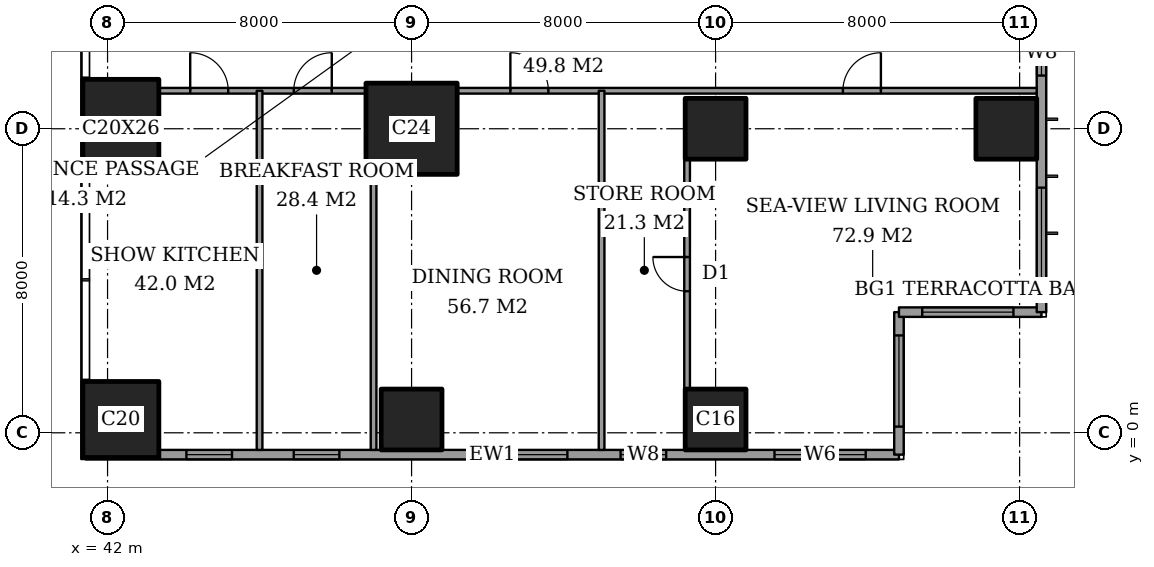
"""IFC4 building model, lengths in metres.
Left out: names, types, materials, properties, quantities, classifications, styles, units other than length and angle.
Written with IfcOpenShell. Run it as: python <this file> out.ifc"""

import sys

from ifc_helpers import new_model, si_unit, direction, frame, frame_2d, origin, origin_2d, place, context, subcontext, project, spatial, rectangle, extrude, element, fill, save


model = new_model("IFC4")
c1 = context("Model", 3, precision=1e-05, world=origin(), true_north=direction((0.0, 1.0)))
c2 = subcontext(c1, "Body", "Model", "MODEL_VIEW")
j1 = project(units=[si_unit("LENGTHUNIT", "METRE"), si_unit("PLANEANGLEUNIT", "RADIAN")], contexts=[c1])
p1 = place(None, origin())
s1 = spatial("IfcSite", under=j1, at=p1, CompositionType="ELEMENT")
p2 = place(p1, origin())
s2 = spatial("IfcBuilding", under=s1, at=p2, CompositionType="ELEMENT")
p3 = place(p2, frame((0.0, 0.0, 230.4)))
s3 = spatial("IfcBuildingStorey", under=s2, at=p3, CompositionType="ELEMENT", Elevation=230.4)
p4 = place(p3, frame((42.35, 0.35, 0.0), z_axis=(0.0, 0.0, 1.0), x_axis=(1.0, 0.0, 0.0)))
e1 = element("IfcColumn", 1, at=p4, inside=s3, PredefinedType="COLUMN", context=c2, shape_type="SweptSolid", body=[
    extrude(rectangle(XDim=2.0, YDim=2.0, at=origin_2d()), origin(), (0.0, 0.0, 1.0), 3.6),
])
p5 = place(p3, frame((42.35, 8.0, 0.0), z_axis=(0.0, 0.0, 1.0), x_axis=(1.0, 0.0, 0.0)))
e2 = element("IfcColumn", 2, at=p5, inside=s3, PredefinedType="COLUMN", context=c2, shape_type="SweptSolid", body=[
    extrude(rectangle(XDim=2.0, YDim=2.6, at=origin_2d()), origin(), (0.0, 0.0, 1.0), 3.6),
])
p6 = place(p3, frame((50.0, 0.35, 0.0), z_axis=(0.0, 0.0, 1.0), x_axis=(1.0, 0.0, 0.0)))
e3 = element("IfcColumn", 3, at=p6, inside=s3, PredefinedType="COLUMN", context=c2, shape_type="SweptSolid", body=[
    extrude(rectangle(XDim=1.6, YDim=1.6, at=origin_2d()), origin(), (0.0, 0.0, 1.0), 3.6),
])
p7 = place(p3, frame((50.0, 8.0, 0.0), z_axis=(0.0, 0.0, 1.0), x_axis=(1.0, 0.0, 0.0)))
e4 = element("IfcColumn", 4, at=p7, inside=s3, PredefinedType="COLUMN", context=c2, shape_type="SweptSolid", body=[
    extrude(rectangle(XDim=2.4, YDim=2.4, at=origin_2d()), origin(), (0.0, 0.0, 1.0), 3.6),
])
for number, where, z_axis, x_axis in (
    (5, (58.0, 0.35, 0.0), (0.0, 0.0, 1.0), (1.0, 0.0, 0.0)),
    (6, (58.0, 8.0, 0.0), (0.0, 0.0, 1.0), (1.0, 0.0, 0.0)),
    (7, (65.65, 8.0, 0.0), (0.0, 0.0, 1.0), (1.0, 0.0, 0.0)),
):
    element("IfcColumn", number, at=place(p3, frame(where, z_axis=z_axis, x_axis=x_axis)), inside=s3, PredefinedType="COLUMN", context=c2, shape_type="SweptSolid", body=[
        extrude(rectangle(XDim=1.6, YDim=1.6, at=origin_2d()), origin(), (0.0, 0.0, 1.0), 3.6),
    ])
p8 = place(p3, frame((41.425, -0.575, 0.0), z_axis=(0.0, 0.0, 1.0), x_axis=(1.0, 0.0, 0.0)))
e8 = element("IfcWall", 8, at=p8, inside=s3, PredefinedType="SOLIDWALL", context=c2, shape_type="SweptSolid", body=[
    extrude(rectangle(XDim=21.4, YDim=0.25, at=frame_2d((10.7, 0.0))), origin(), (0.0, 0.0, 1.0), 3.6),
])
p9 = place(p8, frame((2.65, 0.0, 0.6)))
e9 = element("IfcOpeningElement", 9, at=p9, cuts=e8, PredefinedType="OPENING", context=c2, shape_type="SweptSolid", body=[
    extrude(rectangle(XDim=1.2, YDim=2.0, at=frame_2d((0.6, 1.0))), frame((0.0, 0.135, 0.0), z_axis=(0.0, -1.0, 0.0), x_axis=(1.0, 0.0, 0.0)), (0.0, 0.0, 1.0), 0.27),
])
p10 = place(p8, frame((5.475, 0.0, 0.6)))
e10 = element("IfcOpeningElement", 10, at=p10, cuts=e8, PredefinedType="OPENING", context=c2, shape_type="SweptSolid", body=[
    extrude(rectangle(XDim=1.2, YDim=2.0, at=frame_2d((0.6, 1.0))), frame((0.0, 0.135, 0.0), z_axis=(0.0, -1.0, 0.0), x_axis=(1.0, 0.0, 0.0)), (0.0, 0.0, 1.0), 0.27),
])
p11 = place(p8, frame((10.275, 0.0, 0.6)))
e11 = element("IfcOpeningElement", 11, at=p11, cuts=e8, PredefinedType="OPENING", context=c2, shape_type="SweptSolid", body=[
    extrude(rectangle(XDim=2.4, YDim=2.0, at=frame_2d((1.2, 1.0))), frame((0.0, 0.135, 0.0), z_axis=(0.0, -1.0, 0.0), x_axis=(1.0, 0.0, 0.0)), (0.0, 0.0, 1.0), 0.27),
])
p12 = place(p8, frame((14.075, 0.0, 0.6)))
e12 = element("IfcOpeningElement", 12, at=p12, cuts=e8, PredefinedType="OPENING", context=c2, shape_type="SweptSolid", body=[
    extrude(rectangle(XDim=1.2, YDim=2.0, at=frame_2d((0.6, 1.0))), frame((0.0, 0.135, 0.0), z_axis=(0.0, -1.0, 0.0), x_axis=(1.0, 0.0, 0.0)), (0.0, 0.0, 1.0), 0.27),
])
p13 = place(p8, frame((18.125, 0.0, 0.6)))
e13 = element("IfcOpeningElement", 13, at=p13, cuts=e8, PredefinedType="OPENING", context=c2, shape_type="SweptSolid", body=[
    extrude(rectangle(XDim=2.4, YDim=2.0, at=frame_2d((1.2, 1.0))), frame((0.0, 0.135, 0.0), z_axis=(0.0, -1.0, 0.0), x_axis=(1.0, 0.0, 0.0)), (0.0, 0.0, 1.0), 0.27),
])
p14 = place(p3, frame((62.825, -0.575, 0.0), z_axis=(0.0, 0.0, 1.0), x_axis=(0.0, 1.0, 0.0)))
e14 = element("IfcWall", 14, at=p14, inside=s3, PredefinedType="SOLIDWALL", context=c2, shape_type="SweptSolid", body=[
    extrude(rectangle(XDim=3.75, YDim=0.25, at=frame_2d((1.875, 0.0))), origin(), (0.0, 0.0, 1.0), 3.6),
])
p15 = place(p14, frame((0.738, 0.0, 0.6)))
e15 = element("IfcOpeningElement", 15, at=p15, cuts=e14, PredefinedType="OPENING", context=c2, shape_type="SweptSolid", body=[
    extrude(rectangle(XDim=2.4, YDim=2.0, at=frame_2d((1.2, 1.0))), frame((0.0, 0.135, 0.0), z_axis=(0.0, -1.0, 0.0), x_axis=(1.0, 0.0, 0.0)), (0.0, 0.0, 1.0), 0.27),
])
p16 = place(p3, frame((62.825, 3.175, 0.0), z_axis=(0.0, 0.0, 1.0), x_axis=(1.0, 0.0, 0.0)))
e16 = element("IfcWall", 16, at=p16, inside=s3, PredefinedType="SOLIDWALL", context=c2, shape_type="SweptSolid", body=[
    extrude(rectangle(XDim=3.75, YDim=0.25, at=frame_2d((1.875, 0.0))), origin(), (0.0, 0.0, 1.0), 3.6),
])
p17 = place(p16, frame((0.613, 0.0, 0.6)))
e17 = element("IfcOpeningElement", 17, at=p17, cuts=e16, PredefinedType="OPENING", context=c2, shape_type="SweptSolid", body=[
    extrude(rectangle(XDim=2.4, YDim=2.0, at=frame_2d((1.2, 1.0))), frame((0.0, 0.135, 0.0), z_axis=(0.0, -1.0, 0.0), x_axis=(1.0, 0.0, 0.0)), (0.0, 0.0, 1.0), 0.27),
])
p18 = place(p3, frame((66.575, 3.175, 0.0), z_axis=(0.0, 0.0, 1.0), x_axis=(0.0, 1.0, 0.0)))
e18 = element("IfcWall", 18, at=p18, inside=s3, PredefinedType="SOLIDWALL", context=c2, shape_type="SweptSolid", body=[
    extrude(rectangle(XDim=41.65, YDim=0.25, at=frame_2d((20.825, 0.0))), origin(), (0.0, 0.0, 1.0), 3.6),
])
p19 = place(p18, frame((0.875, 0.0, 0.6)))
e19 = element("IfcOpeningElement", 19, at=p19, cuts=e18, PredefinedType="OPENING", context=c2, shape_type="SweptSolid", body=[
    extrude(rectangle(XDim=2.4, YDim=2.0, at=frame_2d((1.2, 1.0))), frame((0.0, 0.135, 0.0), z_axis=(0.0, -1.0, 0.0), x_axis=(1.0, 0.0, 0.0)), (0.0, 0.0, 1.0), 0.27),
])
p20 = place(p18, frame((6.225, 0.0, 0.6)))
e20 = element("IfcOpeningElement", 20, at=p20, cuts=e18, PredefinedType="OPENING", context=c2, shape_type="SweptSolid", body=[
    extrude(rectangle(XDim=1.2, YDim=2.0, at=frame_2d((0.6, 1.0))), frame((0.0, 0.135, 0.0), z_axis=(0.0, -1.0, 0.0), x_axis=(1.0, 0.0, 0.0)), (0.0, 0.0, 1.0), 0.27),
])
p21 = place(p18, frame((8.725, 0.0, 0.6)))
e21 = element("IfcOpeningElement", 21, at=p21, cuts=e18, PredefinedType="OPENING", context=c2, shape_type="SweptSolid", body=[
    extrude(rectangle(XDim=2.4, YDim=2.0, at=frame_2d((1.2, 1.0))), frame((0.0, 0.135, 0.0), z_axis=(0.0, -1.0, 0.0), x_axis=(1.0, 0.0, 0.0)), (0.0, 0.0, 1.0), 0.27),
])
p22 = place(p18, frame((15.725, 0.0, 0.6)))
e22 = element("IfcOpeningElement", 22, at=p22, cuts=e18, PredefinedType="OPENING", context=c2, shape_type="SweptSolid", body=[
    extrude(rectangle(XDim=2.4, YDim=2.0, at=frame_2d((1.2, 1.0))), frame((0.0, 0.135, 0.0), z_axis=(0.0, -1.0, 0.0), x_axis=(1.0, 0.0, 0.0)), (0.0, 0.0, 1.0), 0.27),
])
p23 = place(p18, frame((23.525, 0.0, 0.6)))
e23 = element("IfcOpeningElement", 23, at=p23, cuts=e18, PredefinedType="OPENING", context=c2, shape_type="SweptSolid", body=[
    extrude(rectangle(XDim=2.4, YDim=2.0, at=frame_2d((1.2, 1.0))), frame((0.0, 0.135, 0.0), z_axis=(0.0, -1.0, 0.0), x_axis=(1.0, 0.0, 0.0)), (0.0, 0.0, 1.0), 0.27),
])
p24 = place(p18, frame((30.725, 0.0, 0.6)))
e24 = element("IfcOpeningElement", 24, at=p24, cuts=e18, PredefinedType="OPENING", context=c2, shape_type="SweptSolid", body=[
    extrude(rectangle(XDim=2.4, YDim=2.0, at=frame_2d((1.2, 1.0))), frame((0.0, 0.135, 0.0), z_axis=(0.0, -1.0, 0.0), x_axis=(1.0, 0.0, 0.0)), (0.0, 0.0, 1.0), 0.27),
])
p25 = place(p18, frame((34.525, 0.0, 0.6)))
e25 = element("IfcOpeningElement", 25, at=p25, cuts=e18, PredefinedType="OPENING", context=c2, shape_type="SweptSolid", body=[
    extrude(rectangle(XDim=1.2, YDim=2.0, at=frame_2d((0.6, 1.0))), frame((0.0, 0.135, 0.0), z_axis=(0.0, -1.0, 0.0), x_axis=(1.0, 0.0, 0.0)), (0.0, 0.0, 1.0), 0.27),
])
p26 = place(p18, frame((38.375, 0.0, 0.6)))
e26 = element("IfcOpeningElement", 26, at=p26, cuts=e18, PredefinedType="OPENING", context=c2, shape_type="SweptSolid", body=[
    extrude(rectangle(XDim=2.4, YDim=2.0, at=frame_2d((1.2, 1.0))), frame((0.0, 0.135, 0.0), z_axis=(0.0, -1.0, 0.0), x_axis=(1.0, 0.0, 0.0)), (0.0, 0.0, 1.0), 0.27),
])
p27 = place(p3, frame((43.35, 9.0, 0.0), z_axis=(0.0, 0.0, 1.0), x_axis=(1.0, 0.0, 0.0)))
e27 = element("IfcWall", 27, at=p27, inside=s3, PredefinedType="PARTITIONING", context=c2, shape_type="SweptSolid", body=[
    extrude(rectangle(XDim=5.45, YDim=0.15, at=frame_2d((2.725, 0.0))), origin(), (0.0, 0.0, 1.0), 3.35),
])
p28 = place(p27, frame((3.55, 0.0, 0.0)))
e28 = element("IfcOpeningElement", 28, at=p28, cuts=e27, PredefinedType="OPENING", context=c2, shape_type="SweptSolid", body=[
    extrude(rectangle(XDim=1.0, YDim=2.1, at=frame_2d((0.5, 1.05))), frame((0.0, 0.085, 0.0), z_axis=(0.0, -1.0, 0.0), x_axis=(1.0, 0.0, 0.0)), (0.0, 0.0, 1.0), 0.17),
])
p29 = place(p27, frame((0.825, 0.0, 0.0)))
e29 = element("IfcOpeningElement", 29, at=p29, cuts=e27, PredefinedType="OPENING", context=c2, shape_type="SweptSolid", body=[
    extrude(rectangle(XDim=1.0, YDim=2.1, at=frame_2d((0.5, 1.05))), frame((0.0, 0.085, 0.0), z_axis=(0.0, -1.0, 0.0), x_axis=(1.0, 0.0, 0.0)), (0.0, 0.0, 1.0), 0.17),
])
p30 = place(p3, frame((51.2, 9.0, 0.0), z_axis=(0.0, 0.0, 1.0), x_axis=(1.0, 0.0, 0.0)))
e30 = element("IfcWall", 30, at=p30, inside=s3, PredefinedType="PARTITIONING", context=c2, shape_type="SweptSolid", body=[
    extrude(rectangle(XDim=15.25, YDim=0.15, at=frame_2d((7.625, 0.0))), origin(), (0.0, 0.0, 1.0), 3.35),
])
p31 = place(p30, frame((10.15, 0.0, 0.0)))
e31 = element("IfcOpeningElement", 31, at=p31, cuts=e30, PredefinedType="OPENING", context=c2, shape_type="SweptSolid", body=[
    extrude(rectangle(XDim=1.0, YDim=2.1, at=frame_2d((0.5, 1.05))), frame((0.0, 0.085, 0.0), z_axis=(0.0, -1.0, 0.0), x_axis=(1.0, 0.0, 0.0)), (0.0, 0.0, 1.0), 0.17),
])
p32 = place(p30, frame((1.4, 0.0, 0.0)))
e32 = element("IfcOpeningElement", 32, at=p32, cuts=e30, PredefinedType="OPENING", context=c2, shape_type="SweptSolid", body=[
    extrude(rectangle(XDim=1.0, YDim=2.1, at=frame_2d((0.5, 1.05))), frame((0.0, 0.085, 0.0), z_axis=(0.0, -1.0, 0.0), x_axis=(1.0, 0.0, 0.0)), (0.0, 0.0, 1.0), 0.17),
])
p33 = place(p3, frame((46.0, -0.45, 0.0), z_axis=(0.0, 0.0, 1.0), x_axis=(0.0, 1.0, 0.0)))
e33 = element("IfcWall", 33, at=p33, inside=s3, PredefinedType="PARTITIONING", context=c2, shape_type="SweptSolid", body=[
    extrude(rectangle(XDim=9.45, YDim=0.15, at=frame_2d((4.725, 0.0))), origin(), (0.0, 0.0, 1.0), 3.35),
])
p34 = place(p3, frame((49.0, -0.45, 0.0), z_axis=(0.0, 0.0, 1.0), x_axis=(0.0, 1.0, 0.0)))
e34 = element("IfcWall", 34, at=p34, inside=s3, PredefinedType="PARTITIONING", context=c2, shape_type="SweptSolid", body=[
    extrude(rectangle(XDim=7.25, YDim=0.15, at=frame_2d((3.625, 0.0))), origin(), (0.0, 0.0, 1.0), 3.35),
])
p35 = place(p3, frame((55.0, -0.45, 0.0), z_axis=(0.0, 0.0, 1.0), x_axis=(0.0, 1.0, 0.0)))
e35 = element("IfcWall", 35, at=p35, inside=s3, PredefinedType="PARTITIONING", context=c2, shape_type="SweptSolid", body=[
    extrude(rectangle(XDim=9.45, YDim=0.15, at=frame_2d((4.725, 0.0))), origin(), (0.0, 0.0, 1.0), 3.35),
])
p36 = place(p3, frame((57.25, 1.15, 0.0), z_axis=(0.0, 0.0, 1.0), x_axis=(0.0, 1.0, 0.0)))
e36 = element("IfcWall", 36, at=p36, inside=s3, PredefinedType="PARTITIONING", context=c2, shape_type="SweptSolid", body=[
    extrude(rectangle(XDim=6.05, YDim=0.15, at=frame_2d((3.025, 0.0))), origin(), (0.0, 0.0, 1.0), 3.35),
])
p37 = place(p36, frame((2.575, 0.0, 0.0)))
e37 = element("IfcOpeningElement", 37, at=p37, cuts=e36, PredefinedType="OPENING", context=c2, shape_type="SweptSolid", body=[
    extrude(rectangle(XDim=0.9, YDim=2.1, at=frame_2d((0.45, 1.05))), frame((0.0, 0.085, 0.0), z_axis=(0.0, -1.0, 0.0), x_axis=(1.0, 0.0, 0.0)), (0.0, 0.0, 1.0), 0.17),
])
p38 = place(p9, origin())
e38 = element("IfcWindow", 38, at=p38, inside=s3, PartitioningType="SINGLE_PANEL", PredefinedType="WINDOW", context=c2, shape_type="SweptSolid", body=[
    extrude(rectangle(XDim=1.2, YDim=2.0, at=frame_2d((0.6, 1.0))), frame((0.0, 0.03, 0.0), z_axis=(0.0, -1.0, 0.0), x_axis=(1.0, 0.0, 0.0)), (0.0, 0.0, 1.0), 0.06),
])
fill(e9, e38)
p39 = place(p10, origin())
e39 = element("IfcWindow", 39, at=p39, inside=s3, PartitioningType="SINGLE_PANEL", PredefinedType="WINDOW", context=c2, shape_type="SweptSolid", body=[
    extrude(rectangle(XDim=1.2, YDim=2.0, at=frame_2d((0.6, 1.0))), frame((0.0, 0.03, 0.0), z_axis=(0.0, -1.0, 0.0), x_axis=(1.0, 0.0, 0.0)), (0.0, 0.0, 1.0), 0.06),
])
fill(e10, e39)
p40 = place(p11, origin())
e40 = element("IfcWindow", 40, at=p40, inside=s3, PartitioningType="SINGLE_PANEL", PredefinedType="WINDOW", context=c2, shape_type="SweptSolid", body=[
    extrude(rectangle(XDim=2.4, YDim=2.0, at=frame_2d((1.2, 1.0))), frame((0.0, 0.03, 0.0), z_axis=(0.0, -1.0, 0.0), x_axis=(1.0, 0.0, 0.0)), (0.0, 0.0, 1.0), 0.06),
])
fill(e11, e40)
p41 = place(p12, origin())
e41 = element("IfcWindow", 41, at=p41, inside=s3, PartitioningType="SINGLE_PANEL", PredefinedType="WINDOW", context=c2, shape_type="SweptSolid", body=[
    extrude(rectangle(XDim=1.2, YDim=2.0, at=frame_2d((0.6, 1.0))), frame((0.0, 0.03, 0.0), z_axis=(0.0, -1.0, 0.0), x_axis=(1.0, 0.0, 0.0)), (0.0, 0.0, 1.0), 0.06),
])
fill(e12, e41)
p42 = place(p13, origin())
e42 = element("IfcWindow", 42, at=p42, inside=s3, PartitioningType="SINGLE_PANEL", PredefinedType="WINDOW", context=c2, shape_type="SweptSolid", body=[
    extrude(rectangle(XDim=2.4, YDim=2.0, at=frame_2d((1.2, 1.0))), frame((0.0, 0.03, 0.0), z_axis=(0.0, -1.0, 0.0), x_axis=(1.0, 0.0, 0.0)), (0.0, 0.0, 1.0), 0.06),
])
fill(e13, e42)
p43 = place(p15, origin())
e43 = element("IfcWindow", 43, at=p43, inside=s3, PartitioningType="SINGLE_PANEL", PredefinedType="WINDOW", context=c2, shape_type="SweptSolid", body=[
    extrude(rectangle(XDim=2.4, YDim=2.0, at=frame_2d((1.2, 1.0))), frame((0.0, 0.03, 0.0), z_axis=(0.0, -1.0, 0.0), x_axis=(1.0, 0.0, 0.0)), (0.0, 0.0, 1.0), 0.06),
])
fill(e15, e43)
p44 = place(p17, origin())
e44 = element("IfcWindow", 44, at=p44, inside=s3, PartitioningType="SINGLE_PANEL", PredefinedType="WINDOW", context=c2, shape_type="SweptSolid", body=[
    extrude(rectangle(XDim=2.4, YDim=2.0, at=frame_2d((1.2, 1.0))), frame((0.0, 0.03, 0.0), z_axis=(0.0, -1.0, 0.0), x_axis=(1.0, 0.0, 0.0)), (0.0, 0.0, 1.0), 0.06),
])
fill(e17, e44)
p45 = place(p19, origin())
e45 = element("IfcWindow", 45, at=p45, inside=s3, PartitioningType="SINGLE_PANEL", PredefinedType="WINDOW", context=c2, shape_type="SweptSolid", body=[
    extrude(rectangle(XDim=2.4, YDim=2.0, at=frame_2d((1.2, 1.0))), frame((0.0, 0.03, 0.0), z_axis=(0.0, -1.0, 0.0), x_axis=(1.0, 0.0, 0.0)), (0.0, 0.0, 1.0), 0.06),
])
fill(e19, e45)
p46 = place(p20, origin())
e46 = element("IfcWindow", 46, at=p46, inside=s3, PartitioningType="SINGLE_PANEL", PredefinedType="WINDOW", context=c2, shape_type="SweptSolid", body=[
    extrude(rectangle(XDim=1.2, YDim=2.0, at=frame_2d((0.6, 1.0))), frame((0.0, 0.03, 0.0), z_axis=(0.0, -1.0, 0.0), x_axis=(1.0, 0.0, 0.0)), (0.0, 0.0, 1.0), 0.06),
])
fill(e20, e46)
p47 = place(p31, origin())
e47 = element("IfcDoor", 47, at=p47, inside=s3, OperationType="SINGLE_SWING_LEFT", PredefinedType="DOOR", context=c2, shape_type="SweptSolid", body=[
    extrude(rectangle(XDim=1.0, YDim=2.1, at=frame_2d((0.5, 1.05))), frame((0.0, 0.025, 0.0), z_axis=(0.0, -1.0, 0.0), x_axis=(1.0, 0.0, 0.0)), (0.0, 0.0, 1.0), 0.05),
])
fill(e31, e47)
p48 = place(p37, origin())
e48 = element("IfcDoor", 48, at=p48, inside=s3, OperationType="SINGLE_SWING_LEFT", PredefinedType="DOOR", context=c2, shape_type="SweptSolid", body=[
    extrude(rectangle(XDim=0.9, YDim=2.1, at=frame_2d((0.45, 1.05))), frame((0.0, 0.025, 0.0), z_axis=(0.0, -1.0, 0.0), x_axis=(1.0, 0.0, 0.0)), (0.0, 0.0, 1.0), 0.05),
])
fill(e37, e48)
p49 = place(p32, origin())
e49 = element("IfcDoor", 49, at=p49, inside=s3, OperationType="SINGLE_SWING_RIGHT", PredefinedType="DOOR", context=c2, shape_type="SweptSolid", body=[
    extrude(rectangle(XDim=1.0, YDim=2.1, at=frame_2d((0.5, 1.05))), frame((0.0, 0.025, 0.0), z_axis=(0.0, -1.0, 0.0), x_axis=(1.0, 0.0, 0.0)), (0.0, 0.0, 1.0), 0.05),
])
fill(e32, e49)
p50 = place(p28, origin())
e50 = element("IfcDoor", 50, at=p50, inside=s3, OperationType="SINGLE_SWING_LEFT", PredefinedType="DOOR", context=c2, shape_type="SweptSolid", body=[
    extrude(rectangle(XDim=1.0, YDim=2.1, at=frame_2d((0.5, 1.05))), frame((0.0, 0.025, 0.0), z_axis=(0.0, -1.0, 0.0), x_axis=(1.0, 0.0, 0.0)), (0.0, 0.0, 1.0), 0.05),
])
fill(e28, e50)
p51 = place(p29, origin())
e51 = element("IfcDoor", 51, at=p51, inside=s3, OperationType="SINGLE_SWING_RIGHT", PredefinedType="DOOR", context=c2, shape_type="SweptSolid", body=[
    extrude(rectangle(XDim=1.0, YDim=2.1, at=frame_2d((0.5, 1.05))), frame((0.0, 0.025, 0.0), z_axis=(0.0, -1.0, 0.0), x_axis=(1.0, 0.0, 0.0)), (0.0, 0.0, 1.0), 0.05),
])
fill(e29, e51)
save(model, sys.argv[1])
